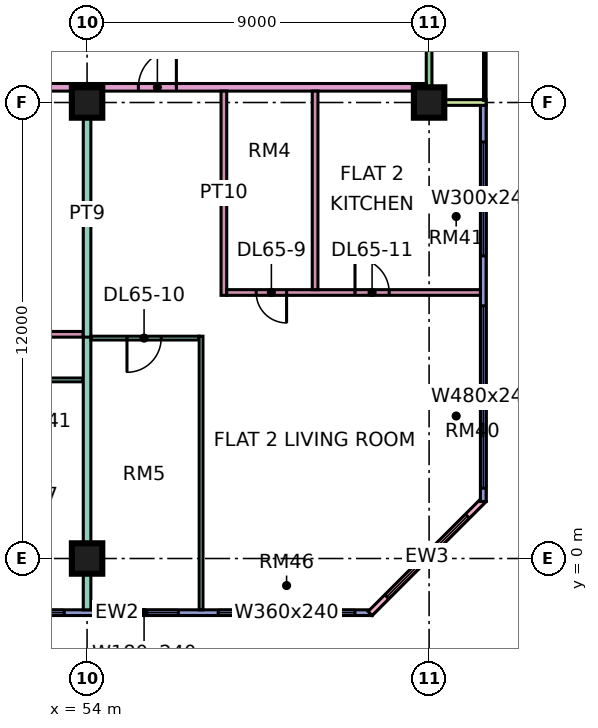
"""IFC4 building model, lengths in metres.
Left out: names, types, materials, properties, quantities, classifications, styles, units other than length and angle.
Written with IfcOpenShell. Run it as: python <this file> out.ifc"""

import sys

from ifc_helpers import new_model, si_unit, direction, frame, frame_2d, origin, origin_2d, place, context, subcontext, project, spatial, rectangle, extrude, element, fill, save


model = new_model("IFC4")
c1 = context("Model", 3, precision=1e-05, world=origin(), true_north=direction((0.0, 1.0)))
c2 = subcontext(c1, "Body", "Model", "MODEL_VIEW")
j1 = project(units=[si_unit("LENGTHUNIT", "METRE"), si_unit("PLANEANGLEUNIT", "RADIAN")], contexts=[c1])
p1 = place(None, origin())
s1 = spatial("IfcSite", under=j1, at=p1, CompositionType="ELEMENT")
p2 = place(p1, origin())
s2 = spatial("IfcBuilding", under=s1, at=p2, CompositionType="ELEMENT")
p3 = place(p2, frame((0.0, 0.0, 280.9)))
s3 = spatial("IfcBuildingStorey", under=s2, at=p3, CompositionType="ELEMENT", Elevation=280.9)
for number, where, z_axis, x_axis in (
    (1, (54.0, 0.0, 0.0), (0.0, 0.0, 1.0), (1.0, 0.0, 0.0)),
    (2, (54.0, 12.0, 0.0), (0.0, 0.0, 1.0), (1.0, 0.0, 0.0)),
    (3, (63.0, 12.0, 0.0), (0.0, 0.0, 1.0), (1.0, 0.0, 0.0)),
):
    element("IfcColumn", number, at=place(p3, frame(where, z_axis=z_axis, x_axis=x_axis)), inside=s3, PredefinedType="COLUMN", context=c2, shape_type="SweptSolid", body=[
        extrude(rectangle(XDim=0.8, YDim=0.8, at=origin_2d()), origin(), (0.0, 0.0, 1.0), 3.75),
    ])
p4 = place(p3, frame((48.075, -1.425, 0.0), z_axis=(0.0, 0.0, 1.0), x_axis=(1.0, 0.0, 0.0)))
e4 = element("IfcWall", 4, at=p4, inside=s3, PredefinedType="SOLIDWALL", context=c2, shape_type="SweptSolid", body=[
    extrude(rectangle(XDim=13.425, YDim=0.15, at=frame_2d((6.712, 0.0))), origin(), (0.0, 0.0, 1.0), 3.35),
])
p5 = place(p4, frame((0.562, 0.0, 0.45)))
e5 = element("IfcOpeningElement", 5, at=p5, cuts=e4, PredefinedType="OPENING", context=c2, shape_type="SweptSolid", body=[
    extrude(rectangle(XDim=1.8, YDim=2.4, at=frame_2d((0.9, 1.2))), frame((0.0, 0.085, 0.0), z_axis=(0.0, -1.0, 0.0), x_axis=(1.0, 0.0, 0.0)), (0.0, 0.0, 1.0), 0.17),
])
p6 = place(p4, frame((3.525, 0.0, 0.45)))
e6 = element("IfcOpeningElement", 6, at=p6, cuts=e4, PredefinedType="OPENING", context=c2, shape_type="SweptSolid", body=[
    extrude(rectangle(XDim=1.8, YDim=2.4, at=frame_2d((0.9, 1.2))), frame((0.0, 0.085, 0.0), z_axis=(0.0, -1.0, 0.0), x_axis=(1.0, 0.0, 0.0)), (0.0, 0.0, 1.0), 0.17),
])
p7 = place(p4, frame((6.525, 0.0, 0.45)))
e7 = element("IfcOpeningElement", 7, at=p7, cuts=e4, PredefinedType="OPENING", context=c2, shape_type="SweptSolid", body=[
    extrude(rectangle(XDim=1.8, YDim=2.4, at=frame_2d((0.9, 1.2))), frame((0.0, 0.085, 0.0), z_axis=(0.0, -1.0, 0.0), x_axis=(1.0, 0.0, 0.0)), (0.0, 0.0, 1.0), 0.17),
])
p8 = place(p4, frame((9.375, 0.0, 0.45)))
e8 = element("IfcOpeningElement", 8, at=p8, cuts=e4, PredefinedType="OPENING", context=c2, shape_type="SweptSolid", body=[
    extrude(rectangle(XDim=3.6, YDim=2.4, at=frame_2d((1.8, 1.2))), frame((0.0, 0.085, 0.0), z_axis=(0.0, -1.0, 0.0), x_axis=(1.0, 0.0, 0.0)), (0.0, 0.0, 1.0), 0.17),
])
p9 = place(p3, frame((61.447, -1.447, 0.0), z_axis=(0.0, 0.0, 1.0), x_axis=(0.707106781187, 0.707106781187, 0.0)))
e9 = element("IfcWall", 9, at=p9, inside=s3, PredefinedType="SOLIDWALL", context=c2, shape_type="SweptSolid", body=[
    extrude(rectangle(XDim=4.243, YDim=0.15, at=frame_2d((2.121, 0.0))), origin(), (0.0, 0.0, 1.0), 3.35),
])
p10 = place(p9, frame((0.621, 0.0, 0.45)))
e10 = element("IfcOpeningElement", 10, at=p10, cuts=e9, PredefinedType="OPENING", context=c2, shape_type="SweptSolid", body=[
    extrude(rectangle(XDim=3.0, YDim=2.4, at=frame_2d((1.5, 1.2))), frame((0.0, 0.085, 0.0), z_axis=(0.0, -1.0, 0.0), x_axis=(1.0, 0.0, 0.0)), (0.0, 0.0, 1.0), 0.17),
])
p11 = place(p3, frame((64.425, 1.5, 0.0), z_axis=(0.0, 0.0, 1.0), x_axis=(0.0, 1.0, 0.0)))
e11 = element("IfcWall", 11, at=p11, inside=s3, PredefinedType="SOLIDWALL", context=c2, shape_type="SweptSolid", body=[
    extrude(rectangle(XDim=10.425, YDim=0.15, at=frame_2d((5.212, 0.0))), origin(), (0.0, 0.0, 1.0), 3.35),
])
p12 = place(p11, frame((0.35, 0.0, 0.45)))
e12 = element("IfcOpeningElement", 12, at=p12, cuts=e11, PredefinedType="OPENING", context=c2, shape_type="SweptSolid", body=[
    extrude(rectangle(XDim=4.8, YDim=2.4, at=frame_2d((2.4, 1.2))), frame((0.0, 0.085, 0.0), z_axis=(0.0, -1.0, 0.0), x_axis=(1.0, 0.0, 0.0)), (0.0, 0.0, 1.0), 0.17),
])
p13 = place(p11, frame((6.462, 0.0, 0.45)))
e13 = element("IfcOpeningElement", 13, at=p13, cuts=e11, PredefinedType="OPENING", context=c2, shape_type="SweptSolid", body=[
    extrude(rectangle(XDim=3.0, YDim=2.4, at=frame_2d((1.5, 1.2))), frame((0.0, 0.085, 0.0), z_axis=(0.0, -1.0, 0.0), x_axis=(1.0, 0.0, 0.0)), (0.0, 0.0, 1.0), 0.17),
])
p14 = place(p3, frame((63.0, 12.075, 0.0), z_axis=(0.0, 0.0, 1.0), x_axis=(0.0, 1.0, 0.0)))
e14 = element("IfcWall", 14, at=p14, inside=s3, PredefinedType="SOLIDWALL", context=c2, shape_type="SweptSolid", body=[
    extrude(rectangle(XDim=10.35, YDim=0.15, at=frame_2d((5.175, 0.0))), origin(), (0.0, 0.0, 1.0), 3.35),
])
p15 = place(p14, frame((3.975, 0.0, 0.45)))
e15 = element("IfcOpeningElement", 15, at=p15, cuts=e14, PredefinedType="OPENING", context=c2, shape_type="SweptSolid", body=[
    extrude(rectangle(XDim=1.8, YDim=2.4, at=frame_2d((0.9, 1.2))), frame((0.0, 0.085, 0.0), z_axis=(0.0, -1.0, 0.0), x_axis=(1.0, 0.0, 0.0)), (0.0, 0.0, 1.0), 0.17),
])
p16 = place(p14, frame((7.988, 0.0, 0.45)))
e16 = element("IfcOpeningElement", 16, at=p16, cuts=e14, PredefinedType="OPENING", context=c2, shape_type="SweptSolid", body=[
    extrude(rectangle(XDim=1.8, YDim=2.4, at=frame_2d((0.9, 1.2))), frame((0.0, 0.085, 0.0), z_axis=(0.0, -1.0, 0.0), x_axis=(1.0, 0.0, 0.0)), (0.0, 0.0, 1.0), 0.17),
])
p17 = place(p3, frame((64.5, 12.0, 0.0), z_axis=(0.0, 0.0, 1.0), x_axis=(-1.0, 0.0, 0.0)))
e17 = element("IfcWall", 17, at=p17, inside=s3, PredefinedType="SOLIDWALL", context=c2, shape_type="SweptSolid", body=[
    extrude(rectangle(XDim=1.5, YDim=0.15, at=frame_2d((0.75, 0.0))), origin(), (0.0, 0.0, 1.0), 3.35),
])
p18 = place(p3, frame((33.05, 4.7, 0.0), z_axis=(0.0, 0.0, 1.0), x_axis=(1.0, 0.0, 0.0)))
e18 = element("IfcWall", 18, at=p18, inside=s3, PredefinedType="PARTITIONING", context=c2, shape_type="SweptSolid", body=[
    extrude(rectangle(XDim=20.85, YDim=0.1, at=frame_2d((10.425, 0.0))), origin(), (0.0, 0.0, 1.0), 3.35),
])
p19 = place(p18, frame((10.0, 0.0, 0.0)))
e19 = element("IfcOpeningElement", 19, at=p19, cuts=e18, PredefinedType="OPENING", context=c2, shape_type="SweptSolid", body=[
    extrude(rectangle(XDim=0.9, YDim=2.1, at=frame_2d((0.45, 1.05))), frame((0.0, 0.06, 0.0), z_axis=(0.0, -1.0, 0.0), x_axis=(1.0, 0.0, 0.0)), (0.0, 0.0, 1.0), 0.12),
])
p20 = place(p18, frame((13.0, 0.0, 0.0)))
e20 = element("IfcOpeningElement", 20, at=p20, cuts=e18, PredefinedType="OPENING", context=c2, shape_type="SweptSolid", body=[
    extrude(rectangle(XDim=0.9, YDim=2.1, at=frame_2d((0.45, 1.05))), frame((0.0, 0.06, 0.0), z_axis=(0.0, -1.0, 0.0), x_axis=(1.0, 0.0, 0.0)), (0.0, 0.0, 1.0), 0.12),
])
p21 = place(p18, frame((16.0, 0.0, 0.0)))
e21 = element("IfcOpeningElement", 21, at=p21, cuts=e18, PredefinedType="OPENING", context=c2, shape_type="SweptSolid", body=[
    extrude(rectangle(XDim=0.9, YDim=2.1, at=frame_2d((0.45, 1.05))), frame((0.0, 0.06, 0.0), z_axis=(0.0, -1.0, 0.0), x_axis=(1.0, 0.0, 0.0)), (0.0, 0.0, 1.0), 0.12),
])
p22 = place(p18, frame((19.0, 0.0, 0.0)))
e22 = element("IfcOpeningElement", 22, at=p22, cuts=e18, PredefinedType="OPENING", context=c2, shape_type="SweptSolid", body=[
    extrude(rectangle(XDim=0.9, YDim=2.1, at=frame_2d((0.45, 1.05))), frame((0.0, 0.06, 0.0), z_axis=(0.0, -1.0, 0.0), x_axis=(1.0, 0.0, 0.0)), (0.0, 0.0, 1.0), 0.12),
])
p23 = place(p18, frame((4.0, 0.0, 0.0)))
e23 = element("IfcOpeningElement", 23, at=p23, cuts=e18, PredefinedType="OPENING", context=c2, shape_type="SweptSolid", body=[
    extrude(rectangle(XDim=0.9, YDim=2.1, at=frame_2d((0.45, 1.05))), frame((0.0, 0.06, 0.0), z_axis=(0.0, -1.0, 0.0), x_axis=(1.0, 0.0, 0.0)), (0.0, 0.0, 1.0), 0.12),
])
p24 = place(p3, frame((40.65, 12.4, 0.0), z_axis=(0.0, 0.0, 1.0), x_axis=(1.0, 0.0, 0.0)))
e24 = element("IfcWall", 24, at=p24, inside=s3, PredefinedType="PARTITIONING", context=c2, shape_type="SweptSolid", body=[
    extrude(rectangle(XDim=22.276, YDim=0.2, at=frame_2d((11.138, 0.0))), origin(), (0.0, 0.0, 1.0), 3.35),
])
p25 = place(p24, frame((14.7, 0.0, 0.0)))
e25 = element("IfcOpeningElement", 25, at=p25, cuts=e24, PredefinedType="OPENING", context=c2, shape_type="SweptSolid", body=[
    extrude(rectangle(XDim=1.0, YDim=2.1, at=frame_2d((0.5, 1.05))), frame((0.0, 0.11, 0.0), z_axis=(0.0, -1.0, 0.0), x_axis=(1.0, 0.0, 0.0)), (0.0, 0.0, 1.0), 0.22),
])
p26 = place(p24, frame((1.05, 0.0, 0.0)))
e26 = element("IfcOpeningElement", 26, at=p26, cuts=e24, PredefinedType="OPENING", context=c2, shape_type="SweptSolid", body=[
    extrude(rectangle(XDim=1.0, YDim=2.1, at=frame_2d((0.5, 1.05))), frame((0.0, 0.11, 0.0), z_axis=(0.0, -1.0, 0.0), x_axis=(1.0, 0.0, 0.0)), (0.0, 0.0, 1.0), 0.22),
])
p27 = place(p3, frame((43.575, 5.9, 0.0), z_axis=(0.0, 0.0, 1.0), x_axis=(1.0, 0.0, 0.0)))
e27 = element("IfcWall", 27, at=p27, inside=s3, PredefinedType="PARTITIONING", context=c2, shape_type="SweptSolid", body=[
    extrude(rectangle(XDim=10.325, YDim=0.15, at=frame_2d((5.163, 0.0))), origin(), (0.0, 0.0, 1.0), 3.35),
])
p28 = place(p27, frame((1.825, 0.0, 0.0)))
e28 = element("IfcOpeningElement", 28, at=p28, cuts=e27, PredefinedType="OPENING", context=c2, shape_type="SweptSolid", body=[
    extrude(rectangle(XDim=0.8, YDim=2.1, at=frame_2d((0.4, 1.05))), frame((0.0, 0.085, 0.0), z_axis=(0.0, -1.0, 0.0), x_axis=(1.0, 0.0, 0.0)), (0.0, 0.0, 1.0), 0.17),
])
p29 = place(p27, frame((6.975, 0.0, 0.0)))
e29 = element("IfcOpeningElement", 29, at=p29, cuts=e27, PredefinedType="OPENING", context=c2, shape_type="SweptSolid", body=[
    extrude(rectangle(XDim=0.9, YDim=2.1, at=frame_2d((0.45, 1.05))), frame((0.0, 0.085, 0.0), z_axis=(0.0, -1.0, 0.0), x_axis=(1.0, 0.0, 0.0)), (0.0, 0.0, 1.0), 0.17),
])
p30 = place(p3, frame((54.0, -1.351, 0.0), z_axis=(0.0, 0.0, 1.0), x_axis=(0.0, 1.0, 0.0)))
e30 = element("IfcWall", 30, at=p30, inside=s3, PredefinedType="PARTITIONING", context=c2, shape_type="SweptSolid", body=[
    extrude(rectangle(XDim=7.201, YDim=0.2, at=frame_2d((3.601, 0.0))), origin(), (0.0, 0.0, 1.0), 3.35),
])
p31 = place(p3, frame((54.0, 5.825, 0.0), z_axis=(0.0, 0.0, 1.0), x_axis=(0.0, 1.0, 0.0)))
e31 = element("IfcWall", 31, at=p31, inside=s3, PredefinedType="PARTITIONING", context=c2, shape_type="SweptSolid", body=[
    extrude(rectangle(XDim=6.475, YDim=0.2, at=frame_2d((3.238, 0.0))), origin(), (0.0, 0.0, 1.0), 3.35),
])
p32 = place(p3, frame((54.1, 5.8, 0.0), z_axis=(0.0, 0.0, 1.0), x_axis=(1.0, 0.0, 0.0)))
e32 = element("IfcWall", 32, at=p32, inside=s3, PredefinedType="PARTITIONING", context=c2, shape_type="SweptSolid", body=[
    extrude(rectangle(XDim=2.85, YDim=0.1, at=frame_2d((1.425, 0.0))), origin(), (0.0, 0.0, 1.0), 3.35),
])
p33 = place(p32, frame((0.95, 0.0, 0.0)))
e33 = element("IfcOpeningElement", 33, at=p33, cuts=e32, PredefinedType="OPENING", context=c2, shape_type="SweptSolid", body=[
    extrude(rectangle(XDim=0.9, YDim=2.1, at=frame_2d((0.45, 1.05))), frame((0.0, 0.06, 0.0), z_axis=(0.0, -1.0, 0.0), x_axis=(1.0, 0.0, 0.0)), (0.0, 0.0, 1.0), 0.12),
])
p34 = place(p3, frame((57.0, -1.35, 0.0), z_axis=(0.0, 0.0, 1.0), x_axis=(0.0, 1.0, 0.0)))
e34 = element("IfcWall", 34, at=p34, inside=s3, PredefinedType="PARTITIONING", context=c2, shape_type="SweptSolid", body=[
    extrude(rectangle(XDim=7.2, YDim=0.1, at=frame_2d((3.6, 0.0))), origin(), (0.0, 0.0, 1.0), 3.35),
])
p35 = place(p3, frame((57.6, 6.925, 0.0), z_axis=(0.0, 0.0, 1.0), x_axis=(0.0, 1.0, 0.0)))
e35 = element("IfcWall", 35, at=p35, inside=s3, PredefinedType="PARTITIONING", context=c2, shape_type="SweptSolid", body=[
    extrude(rectangle(XDim=5.375, YDim=0.15, at=frame_2d((2.688, 0.0))), origin(), (0.0, 0.0, 1.0), 3.35),
])
p36 = place(p3, frame((57.675, 7.0, 0.0), z_axis=(0.0, 0.0, 1.0), x_axis=(1.0, 0.0, 0.0)))
e36 = element("IfcWall", 36, at=p36, inside=s3, PredefinedType="PARTITIONING", context=c2, shape_type="SweptSolid", body=[
    extrude(rectangle(XDim=6.675, YDim=0.15, at=frame_2d((3.337, 0.0))), origin(), (0.0, 0.0, 1.0), 3.35),
])
p37 = place(p36, frame((0.775, 0.0, 0.0)))
e37 = element("IfcOpeningElement", 37, at=p37, cuts=e36, PredefinedType="OPENING", context=c2, shape_type="SweptSolid", body=[
    extrude(rectangle(XDim=0.8, YDim=2.1, at=frame_2d((0.4, 1.05))), frame((0.0, 0.085, 0.0), z_axis=(0.0, -1.0, 0.0), x_axis=(1.0, 0.0, 0.0)), (0.0, 0.0, 1.0), 0.17),
])
p38 = place(p36, frame((3.375, 0.0, 0.0)))
e38 = element("IfcOpeningElement", 38, at=p38, cuts=e36, PredefinedType="OPENING", context=c2, shape_type="SweptSolid", body=[
    extrude(rectangle(XDim=0.9, YDim=2.1, at=frame_2d((0.45, 1.05))), frame((0.0, 0.085, 0.0), z_axis=(0.0, -1.0, 0.0), x_axis=(1.0, 0.0, 0.0)), (0.0, 0.0, 1.0), 0.17),
])
p39 = place(p3, frame((60.0, 7.075, 0.0), z_axis=(0.0, 0.0, 1.0), x_axis=(0.0, 1.0, 0.0)))
e39 = element("IfcWall", 39, at=p39, inside=s3, PredefinedType="PARTITIONING", context=c2, shape_type="SweptSolid", body=[
    extrude(rectangle(XDim=5.225, YDim=0.15, at=frame_2d((2.613, 0.0))), origin(), (0.0, 0.0, 1.0), 3.35),
])
p40 = place(p6, origin())
e40 = element("IfcWindow", 40, at=p40, inside=s3, PartitioningType="SINGLE_PANEL", PredefinedType="WINDOW", context=c2, shape_type="SweptSolid", body=[
    extrude(rectangle(XDim=1.8, YDim=2.4, at=frame_2d((0.9, 1.2))), frame((0.0, 0.03, 0.0), z_axis=(0.0, -1.0, 0.0), x_axis=(1.0, 0.0, 0.0)), (0.0, 0.0, 1.0), 0.06),
])
fill(e6, e40)
p41 = place(p7, origin())
e41 = element("IfcWindow", 41, at=p41, inside=s3, PartitioningType="SINGLE_PANEL", PredefinedType="WINDOW", context=c2, shape_type="SweptSolid", body=[
    extrude(rectangle(XDim=1.8, YDim=2.4, at=frame_2d((0.9, 1.2))), frame((0.0, 0.03, 0.0), z_axis=(0.0, -1.0, 0.0), x_axis=(1.0, 0.0, 0.0)), (0.0, 0.0, 1.0), 0.06),
])
fill(e7, e41)
p42 = place(p8, origin())
e42 = element("IfcWindow", 42, at=p42, inside=s3, PartitioningType="SINGLE_PANEL", PredefinedType="WINDOW", context=c2, shape_type="SweptSolid", body=[
    extrude(rectangle(XDim=3.6, YDim=2.4, at=frame_2d((1.8, 1.2))), frame((0.0, 0.03, 0.0), z_axis=(0.0, -1.0, 0.0), x_axis=(1.0, 0.0, 0.0)), (0.0, 0.0, 1.0), 0.06),
])
fill(e8, e42)
p43 = place(p10, origin())
e43 = element("IfcWindow", 43, at=p43, inside=s3, PartitioningType="SINGLE_PANEL", PredefinedType="WINDOW", context=c2, shape_type="SweptSolid", body=[
    extrude(rectangle(XDim=3.0, YDim=2.4, at=frame_2d((1.5, 1.2))), frame((0.0, 0.03, 0.0), z_axis=(0.0, -1.0, 0.0), x_axis=(1.0, 0.0, 0.0)), (0.0, 0.0, 1.0), 0.06),
])
fill(e10, e43)
p44 = place(p12, origin())
e44 = element("IfcWindow", 44, at=p44, inside=s3, PartitioningType="SINGLE_PANEL", PredefinedType="WINDOW", context=c2, shape_type="SweptSolid", body=[
    extrude(rectangle(XDim=4.8, YDim=2.4, at=frame_2d((2.4, 1.2))), frame((0.0, 0.03, 0.0), z_axis=(0.0, -1.0, 0.0), x_axis=(1.0, 0.0, 0.0)), (0.0, 0.0, 1.0), 0.06),
])
fill(e12, e44)
p45 = place(p13, origin())
e45 = element("IfcWindow", 45, at=p45, inside=s3, PartitioningType="SINGLE_PANEL", PredefinedType="WINDOW", context=c2, shape_type="SweptSolid", body=[
    extrude(rectangle(XDim=3.0, YDim=2.4, at=frame_2d((1.5, 1.2))), frame((0.0, 0.03, 0.0), z_axis=(0.0, -1.0, 0.0), x_axis=(1.0, 0.0, 0.0)), (0.0, 0.0, 1.0), 0.06),
])
fill(e13, e45)
p46 = place(p37, origin())
e46 = element("IfcDoor", 46, at=p46, inside=s3, OperationType="SINGLE_SWING_RIGHT", PredefinedType="DOOR", context=c2, shape_type="SweptSolid", body=[
    extrude(rectangle(XDim=0.8, YDim=2.1, at=frame_2d((0.4, 1.05))), frame((0.0, 0.025, 0.0), z_axis=(0.0, -1.0, 0.0), x_axis=(1.0, 0.0, 0.0)), (0.0, 0.0, 1.0), 0.05),
])
fill(e37, e46)
p47 = place(p33, frame((0.9, 0.0, 0.0), z_axis=(0.0, 0.0, 1.0), x_axis=(-1.0, 0.0, 0.0)))
e47 = element("IfcDoor", 47, at=p47, inside=s3, OperationType="SINGLE_SWING_LEFT", PredefinedType="DOOR", context=c2, shape_type="SweptSolid", body=[
    extrude(rectangle(XDim=0.9, YDim=2.1, at=frame_2d((0.45, 1.05))), frame((0.0, 0.025, 0.0), z_axis=(0.0, -1.0, 0.0), x_axis=(1.0, 0.0, 0.0)), (0.0, 0.0, 1.0), 0.05),
])
fill(e33, e47)
p48 = place(p38, origin())
e48 = element("IfcDoor", 48, at=p48, inside=s3, OperationType="SINGLE_SWING_LEFT", PredefinedType="DOOR", context=c2, shape_type="SweptSolid", body=[
    extrude(rectangle(XDim=0.9, YDim=2.1, at=frame_2d((0.45, 1.05))), frame((0.0, 0.025, 0.0), z_axis=(0.0, -1.0, 0.0), x_axis=(1.0, 0.0, 0.0)), (0.0, 0.0, 1.0), 0.05),
])
fill(e38, e48)
p49 = place(p25, frame((1.0, 0.0, 0.0), z_axis=(0.0, 0.0, 1.0), x_axis=(-1.0, 0.0, 0.0)))
e49 = element("IfcDoor", 49, at=p49, inside=s3, OperationType="SINGLE_SWING_RIGHT", PredefinedType="DOOR", context=c2, shape_type="SweptSolid", body=[
    extrude(rectangle(XDim=1.0, YDim=2.1, at=frame_2d((0.5, 1.05))), frame((0.0, 0.025, 0.0), z_axis=(0.0, -1.0, 0.0), x_axis=(1.0, 0.0, 0.0)), (0.0, 0.0, 1.0), 0.05),
])
fill(e25, e49)
save(model, sys.argv[1])
